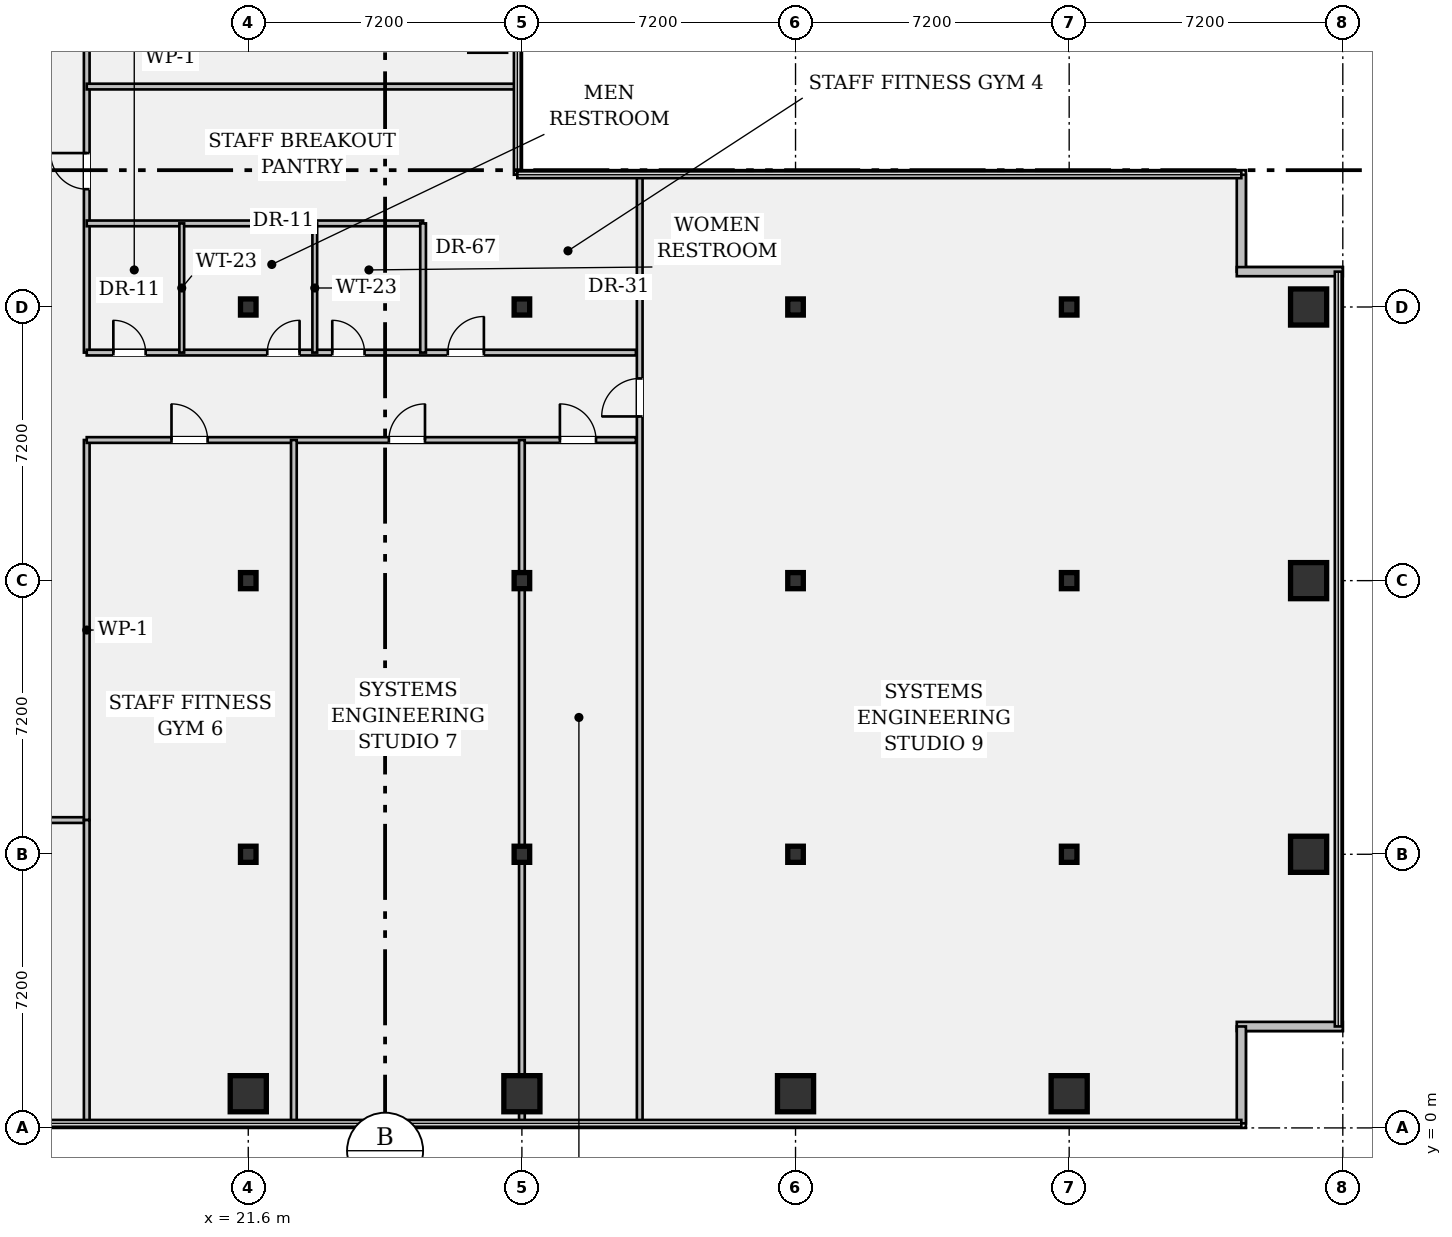
"""IFC4 building model, lengths in metres.
Left out: names, types, materials, properties, quantities, classifications, styles, units other than length and angle.
Written with IfcOpenShell. Run it as: python <this file> out.ifc"""

import sys

from ifc_helpers import new_model, si_unit, direction, frame, frame_2d, origin, origin_2d, place, context, subcontext, project, spatial, rectangle, hollow_rectangle, i_section, extrude, element, fill, save


model = new_model("IFC4")
c1 = context("Model", 3, precision=1e-05, world=origin(), true_north=direction((0.0, 1.0)))
c2 = subcontext(c1, "Body", "Model", "MODEL_VIEW")
j1 = project(units=[si_unit("LENGTHUNIT", "METRE"), si_unit("PLANEANGLEUNIT", "RADIAN")], contexts=[c1])
p1 = place(None, origin())
s1 = spatial("IfcSite", under=j1, at=p1, CompositionType="ELEMENT")
p2 = place(p1, origin())
s2 = spatial("IfcBuilding", under=s1, at=p2, CompositionType="ELEMENT")
p3 = place(p2, frame((0.0, 0.0, 77.35)))
s3 = spatial("IfcBuildingStorey", under=s2, at=p3, CompositionType="ELEMENT", Elevation=77.35)
p4 = place(p3, frame((21.6, 0.9, 0.0), z_axis=(0.0, 0.0, 1.0), x_axis=(1.0, 0.0, 0.0)))
e1 = element("IfcColumn", 1, at=p4, inside=s3, PredefinedType="COLUMN", context=c2, shape_type="SweptSolid", body=[
    extrude(hollow_rectangle(XDim=0.95, YDim=0.95, WallThickness=0.06, at=origin_2d()), origin(), (0.0, 0.0, 1.0), 3.57),
])
for number, where, z_axis, x_axis in (
    (2, (21.6, 7.2, 0.0), (0.0, 0.0, 1.0), (1.0, 0.0, 0.0)),
    (3, (21.6, 14.4, 0.0), (0.0, 0.0, 1.0), (1.0, 0.0, 0.0)),
    (4, (21.6, 21.6, 0.0), (0.0, 0.0, 1.0), (1.0, 0.0, 0.0)),
):
    element("IfcColumn", number, at=place(p3, frame(where, z_axis=z_axis, x_axis=x_axis)), inside=s3, PredefinedType="COLUMN", context=c2, shape_type="SweptSolid", body=[
        extrude(i_section(OverallWidth=0.409, OverallDepth=0.424, WebThickness=0.033, FlangeThickness=0.052, FilletRadius=0.018, at=origin_2d()), origin(), (0.0, 0.0, 1.0), 3.57),
    ])
p5 = place(p3, frame((28.8, 0.9, 0.0), z_axis=(0.0, 0.0, 1.0), x_axis=(1.0, 0.0, 0.0)))
e5 = element("IfcColumn", 5, at=p5, inside=s3, PredefinedType="COLUMN", context=c2, shape_type="SweptSolid", body=[
    extrude(hollow_rectangle(XDim=0.95, YDim=0.95, WallThickness=0.06, at=origin_2d()), origin(), (0.0, 0.0, 1.0), 3.57),
])
for number, where, z_axis, x_axis in (
    (6, (28.8, 7.2, 0.0), (0.0, 0.0, 1.0), (1.0, 0.0, 0.0)),
    (7, (28.8, 14.4, 0.0), (0.0, 0.0, 1.0), (1.0, 0.0, 0.0)),
    (8, (28.8, 21.6, 0.0), (0.0, 0.0, 1.0), (1.0, 0.0, 0.0)),
):
    element("IfcColumn", number, at=place(p3, frame(where, z_axis=z_axis, x_axis=x_axis)), inside=s3, PredefinedType="COLUMN", context=c2, shape_type="SweptSolid", body=[
        extrude(i_section(OverallWidth=0.409, OverallDepth=0.424, WebThickness=0.033, FlangeThickness=0.052, FilletRadius=0.018, at=origin_2d()), origin(), (0.0, 0.0, 1.0), 3.57),
    ])
p6 = place(p3, frame((36.0, 0.9, 0.0), z_axis=(0.0, 0.0, 1.0), x_axis=(1.0, 0.0, 0.0)))
e9 = element("IfcColumn", 9, at=p6, inside=s3, PredefinedType="COLUMN", context=c2, shape_type="SweptSolid", body=[
    extrude(hollow_rectangle(XDim=0.95, YDim=0.95, WallThickness=0.06, at=origin_2d()), origin(), (0.0, 0.0, 1.0), 3.57),
])
for number, where, z_axis, x_axis in (
    (10, (36.0, 7.2, 0.0), (0.0, 0.0, 1.0), (1.0, 0.0, 0.0)),
    (11, (36.0, 14.4, 0.0), (0.0, 0.0, 1.0), (1.0, 0.0, 0.0)),
    (12, (36.0, 21.6, 0.0), (0.0, 0.0, 1.0), (1.0, 0.0, 0.0)),
):
    element("IfcColumn", number, at=place(p3, frame(where, z_axis=z_axis, x_axis=x_axis)), inside=s3, PredefinedType="COLUMN", context=c2, shape_type="SweptSolid", body=[
        extrude(i_section(OverallWidth=0.409, OverallDepth=0.424, WebThickness=0.033, FlangeThickness=0.052, FilletRadius=0.018, at=origin_2d()), origin(), (0.0, 0.0, 1.0), 3.57),
    ])
p7 = place(p3, frame((43.2, 0.9, 0.0), z_axis=(0.0, 0.0, 1.0), x_axis=(1.0, 0.0, 0.0)))
e13 = element("IfcColumn", 13, at=p7, inside=s3, PredefinedType="COLUMN", context=c2, shape_type="SweptSolid", body=[
    extrude(hollow_rectangle(XDim=0.95, YDim=0.95, WallThickness=0.06, at=origin_2d()), origin(), (0.0, 0.0, 1.0), 3.57),
])
for number, where, z_axis, x_axis in (
    (14, (43.2, 7.2, 0.0), (0.0, 0.0, 1.0), (1.0, 0.0, 0.0)),
    (15, (43.2, 14.4, 0.0), (0.0, 0.0, 1.0), (1.0, 0.0, 0.0)),
    (16, (43.2, 21.6, 0.0), (0.0, 0.0, 1.0), (1.0, 0.0, 0.0)),
):
    element("IfcColumn", number, at=place(p3, frame(where, z_axis=z_axis, x_axis=x_axis)), inside=s3, PredefinedType="COLUMN", context=c2, shape_type="SweptSolid", body=[
        extrude(i_section(OverallWidth=0.409, OverallDepth=0.424, WebThickness=0.033, FlangeThickness=0.052, FilletRadius=0.018, at=origin_2d()), origin(), (0.0, 0.0, 1.0), 3.57),
    ])
for number, where, z_axis, x_axis in (
    (17, (49.5, 7.2, 0.0), (0.0, 0.0, 1.0), (1.0, 0.0, 0.0)),
    (18, (49.5, 14.4, 0.0), (0.0, 0.0, 1.0), (1.0, 0.0, 0.0)),
    (19, (49.5, 21.6, 0.0), (0.0, 0.0, 1.0), (1.0, 0.0, 0.0)),
):
    element("IfcColumn", number, at=place(p3, frame(where, z_axis=z_axis, x_axis=x_axis)), inside=s3, PredefinedType="COLUMN", context=c2, shape_type="SweptSolid", body=[
        extrude(hollow_rectangle(XDim=0.95, YDim=0.95, WallThickness=0.06, at=origin_2d()), origin(), (0.0, 0.0, 1.0), 3.57),
    ])
p8 = place(p3, frame((47.73, 25.08, 0.0), z_axis=(0.0, 0.0, 1.0), x_axis=(0.0, -1.0, 0.0)))
e20 = element("IfcWall", 20, at=p8, inside=s3, PredefinedType="STANDARD", context=c2, shape_type="SweptSolid", body=[
    extrude(rectangle(XDim=2.55, YDim=0.24, at=frame_2d((1.275, 0.0))), origin(), (0.0, 0.0, 1.0), 3.57),
])
for number, where, z_axis, x_axis in (
    (21, (47.61, 22.53, 0.0), (0.0, 0.0, 1.0), (1.0, 0.0, 0.0)),
    (22, (50.4, 2.67, 0.0), (0.0, 0.0, 1.0), (-1.0, 0.0, 0.0)),
):
    element("IfcWall", number, at=place(p3, frame(where, z_axis=z_axis, x_axis=x_axis)), inside=s3, PredefinedType="STANDARD", context=c2, shape_type="SweptSolid", body=[
        extrude(rectangle(XDim=2.79, YDim=0.24, at=frame_2d((1.395, 0.0))), origin(), (0.0, 0.0, 1.0), 3.57),
    ])
p9 = place(p3, frame((47.73, 2.67, 0.0), z_axis=(0.0, 0.0, 1.0), x_axis=(0.0, -1.0, 0.0)))
e23 = element("IfcWall", 23, at=p9, inside=s3, PredefinedType="STANDARD", context=c2, shape_type="SweptSolid", body=[
    extrude(rectangle(XDim=2.55, YDim=0.24, at=frame_2d((1.275, 0.0))), origin(), (0.0, 0.0, 1.0), 3.57),
])
p10 = place(p3, frame((14.4, 8.1, 0.0), z_axis=(0.0, 0.0, 1.0), x_axis=(1.0, 0.0, 0.0)))
e24 = element("IfcWall", 24, at=p10, inside=s3, PredefinedType="PARTITIONING", context=c2, shape_type="SweptSolid", body=[
    extrude(rectangle(XDim=2.95, YDim=0.15, at=frame_2d((1.475, 0.0))), origin(), (0.0, 0.0, 1.0), 3.088),
])
p11 = place(p10, frame((0.95, 0.0, 0.0)))
e25 = element("IfcOpeningElement", 25, at=p11, cuts=e24, PredefinedType="OPENING", context=c2, shape_type="SweptSolid", body=[
    extrude(rectangle(XDim=0.95, YDim=2.15, at=frame_2d((0.475, 1.075))), frame((0.0, 0.087, 0.0), z_axis=(0.0, -1.0, 0.0), x_axis=(1.0, 0.0, 0.0)), (0.0, 0.0, 1.0), 0.174),
])
p12 = place(p3, frame((17.35, 8.1, 0.0), z_axis=(0.0, 0.0, 1.0), x_axis=(0.0, 1.0, 0.0)))
e26 = element("IfcWall", 26, at=p12, inside=s3, PredefinedType="PARTITIONING", context=c2, shape_type="SweptSolid", body=[
    extrude(rectangle(XDim=10.0, YDim=0.15, at=frame_2d((5.0, 0.0))), origin(), (0.0, 0.0, 1.0), 2.783),
])
p13 = place(p3, frame((17.35, 20.4, 0.0), z_axis=(0.0, 0.0, 1.0), x_axis=(0.0, 1.0, 0.0)))
e27 = element("IfcWall", 27, at=p13, inside=s3, PredefinedType="PARTITIONING", context=c2, shape_type="SweptSolid", body=[
    extrude(rectangle(XDim=15.5, YDim=0.15, at=frame_2d((7.75, 0.0))), origin(), (0.0, 0.0, 1.0), 2.783),
])
p14 = place(p13, frame((4.3, 0.0, 0.0)))
e28 = element("IfcOpeningElement", 28, at=p14, cuts=e27, PredefinedType="OPENING", context=c2, shape_type="SweptSolid", body=[
    extrude(rectangle(XDim=0.95, YDim=2.15, at=frame_2d((0.475, 1.075))), frame((0.0, 0.087, 0.0), z_axis=(0.0, -1.0, 0.0), x_axis=(1.0, 0.0, 0.0)), (0.0, 0.0, 1.0), 0.174),
])
p15 = place(p13, frame((8.4, 0.0, 0.0)))
e29 = element("IfcOpeningElement", 29, at=p15, cuts=e27, PredefinedType="OPENING", context=c2, shape_type="SweptSolid", body=[
    extrude(rectangle(XDim=1.0, YDim=2.15, at=frame_2d((0.5, 1.075))), frame((0.0, 0.087, 0.0), z_axis=(0.0, -1.0, 0.0), x_axis=(1.0, 0.0, 0.0)), (0.0, 0.0, 1.0), 0.174),
])
p16 = place(p3, frame((17.35, 18.1, 0.0), z_axis=(0.0, 0.0, 1.0), x_axis=(1.0, 0.0, 0.0)))
e30 = element("IfcWall", 30, at=p16, inside=s3, PredefinedType="PARTITIONING", context=c2, shape_type="SweptSolid", body=[
    extrude(rectangle(XDim=14.45, YDim=0.15, at=frame_2d((7.225, 0.0))), origin(), (0.0, 0.0, 1.0), 2.783),
])
p17 = place(p16, frame((2.23, 0.0, 0.0)))
e31 = element("IfcOpeningElement", 31, at=p17, cuts=e30, PredefinedType="OPENING", context=c2, shape_type="SweptSolid", body=[
    extrude(rectangle(XDim=0.95, YDim=2.15, at=frame_2d((0.475, 1.075))), frame((0.0, 0.087, 0.0), z_axis=(0.0, -1.0, 0.0), x_axis=(1.0, 0.0, 0.0)), (0.0, 0.0, 1.0), 0.174),
])
p18 = place(p16, frame((7.95, 0.0, 0.0)))
e32 = element("IfcOpeningElement", 32, at=p18, cuts=e30, PredefinedType="OPENING", context=c2, shape_type="SweptSolid", body=[
    extrude(rectangle(XDim=0.95, YDim=2.15, at=frame_2d((0.475, 1.075))), frame((0.0, 0.087, 0.0), z_axis=(0.0, -1.0, 0.0), x_axis=(1.0, 0.0, 0.0)), (0.0, 0.0, 1.0), 0.174),
])
p19 = place(p16, frame((12.45, 0.0, 0.0)))
e33 = element("IfcOpeningElement", 33, at=p19, cuts=e30, PredefinedType="OPENING", context=c2, shape_type="SweptSolid", body=[
    extrude(rectangle(XDim=0.95, YDim=2.15, at=frame_2d((0.475, 1.075))), frame((0.0, 0.087, 0.0), z_axis=(0.0, -1.0, 0.0), x_axis=(1.0, 0.0, 0.0)), (0.0, 0.0, 1.0), 0.174),
])
p20 = place(p3, frame((17.35, 20.4, 0.0), z_axis=(0.0, 0.0, 1.0), x_axis=(1.0, 0.0, 0.0)))
e34 = element("IfcWall", 34, at=p20, inside=s3, PredefinedType="PARTITIONING", context=c2, shape_type="SweptSolid", body=[
    extrude(rectangle(XDim=14.45, YDim=0.15, at=frame_2d((7.225, 0.0))), origin(), (0.0, 0.0, 1.0), 2.783),
])
p21 = place(p20, frame((0.7, 0.0, 0.0)))
e35 = element("IfcOpeningElement", 35, at=p21, cuts=e34, PredefinedType="OPENING", context=c2, shape_type="SweptSolid", body=[
    extrude(rectangle(XDim=0.85, YDim=2.15, at=frame_2d((0.425, 1.075))), frame((0.0, 0.087, 0.0), z_axis=(0.0, -1.0, 0.0), x_axis=(1.0, 0.0, 0.0)), (0.0, 0.0, 1.0), 0.174),
])
p22 = place(p20, frame((4.75, 0.0, 0.0)))
e36 = element("IfcOpeningElement", 36, at=p22, cuts=e34, PredefinedType="OPENING", context=c2, shape_type="SweptSolid", body=[
    extrude(rectangle(XDim=0.85, YDim=2.15, at=frame_2d((0.425, 1.075))), frame((0.0, 0.087, 0.0), z_axis=(0.0, -1.0, 0.0), x_axis=(1.0, 0.0, 0.0)), (0.0, 0.0, 1.0), 0.174),
])
p23 = place(p20, frame((6.46, 0.0, 0.0)))
e37 = element("IfcOpeningElement", 37, at=p23, cuts=e34, PredefinedType="OPENING", context=c2, shape_type="SweptSolid", body=[
    extrude(rectangle(XDim=0.85, YDim=2.15, at=frame_2d((0.425, 1.075))), frame((0.0, 0.087, 0.0), z_axis=(0.0, -1.0, 0.0), x_axis=(1.0, 0.0, 0.0)), (0.0, 0.0, 1.0), 0.174),
])
p24 = place(p20, frame((9.5, 0.0, 0.0)))
e38 = element("IfcOpeningElement", 38, at=p24, cuts=e34, PredefinedType="OPENING", context=c2, shape_type="SweptSolid", body=[
    extrude(rectangle(XDim=0.95, YDim=2.15, at=frame_2d((0.475, 1.075))), frame((0.0, 0.087, 0.0), z_axis=(0.0, -1.0, 0.0), x_axis=(1.0, 0.0, 0.0)), (0.0, 0.0, 1.0), 0.174),
])
p25 = place(p3, frame((31.9, 0.12, 0.0), z_axis=(0.0, 0.0, 1.0), x_axis=(0.0, 1.0, 0.0)))
e39 = element("IfcWall", 39, at=p25, inside=s3, PredefinedType="PARTITIONING", context=c2, shape_type="SweptSolid", body=[
    extrude(rectangle(XDim=24.96, YDim=0.15, at=frame_2d((12.48, 0.0))), origin(), (0.0, 0.0, 1.0), 2.783),
])
p26 = place(p25, frame((18.6, 0.0, 0.0)))
e40 = element("IfcOpeningElement", 40, at=p26, cuts=e39, PredefinedType="OPENING", context=c2, shape_type="SweptSolid", body=[
    extrude(rectangle(XDim=1.0, YDim=2.15, at=frame_2d((0.5, 1.075))), frame((0.0, 0.087, 0.0), z_axis=(0.0, -1.0, 0.0), x_axis=(1.0, 0.0, 0.0)), (0.0, 0.0, 1.0), 0.174),
])
p27 = place(p3, frame((17.35, 23.8, 0.0), z_axis=(0.0, 0.0, 1.0), x_axis=(1.0, 0.0, 0.0)))
e41 = element("IfcWall", 41, at=p27, inside=s3, PredefinedType="PARTITIONING", context=c2, shape_type="SweptSolid", body=[
    extrude(rectangle(XDim=8.85, YDim=0.15, at=frame_2d((4.425, 0.0))), origin(), (0.0, 0.0, 1.0), 2.783),
])
p28 = place(p3, frame((26.2, 20.4, 0.0), z_axis=(0.0, 0.0, 1.0), x_axis=(0.0, 1.0, 0.0)))
e42 = element("IfcWall", 42, at=p28, inside=s3, PredefinedType="PARTITIONING", context=c2, shape_type="SweptSolid", body=[
    extrude(rectangle(XDim=3.4, YDim=0.15, at=frame_2d((1.7, 0.0))), origin(), (0.0, 0.0, 1.0), 2.783),
])
for number, where, z_axis, x_axis in (
    (43, (19.85, 20.4, 0.0), (0.0, 0.0, 1.0), (0.0, 1.0, 0.0)),
    (44, (23.35, 20.4, 0.0), (0.0, 0.0, 1.0), (0.0, 1.0, 0.0)),
):
    element("IfcWall", number, at=place(p3, frame(where, z_axis=z_axis, x_axis=x_axis)), inside=s3, PredefinedType="PARTITIONING", context=c2, shape_type="SweptSolid", body=[
        extrude(rectangle(XDim=3.4, YDim=0.125, at=frame_2d((1.7, 0.0))), origin(), (0.0, 0.0, 1.0), 2.783),
    ])
p29 = place(p3, frame((17.35, 27.4, 0.0), z_axis=(0.0, 0.0, 1.0), x_axis=(1.0, 0.0, 0.0)))
e45 = element("IfcWall", 45, at=p29, inside=s3, PredefinedType="PARTITIONING", context=c2, shape_type="SweptSolid", body=[
    extrude(rectangle(XDim=11.33, YDim=0.15, at=frame_2d((5.665, 0.0))), origin(), (0.0, 0.0, 1.0), 2.783),
])
p30 = place(p3, frame((17.35, 0.12, 0.0), z_axis=(0.0, 0.0, 1.0), x_axis=(0.0, 1.0, 0.0)))
e46 = element("IfcWall", 46, at=p30, inside=s3, PredefinedType="PARTITIONING", context=c2, shape_type="SweptSolid", body=[
    extrude(rectangle(XDim=7.98, YDim=0.15, at=frame_2d((3.99, 0.0))), origin(), (0.0, 0.0, 1.0), 2.783),
])
for number, where, z_axis, x_axis in (
    (47, (22.8, 0.12, 0.0), (0.0, 0.0, 1.0), (0.0, 1.0, 0.0)),
    (48, (28.8, 0.12, 0.0), (0.0, 0.0, 1.0), (0.0, 1.0, 0.0)),
):
    element("IfcWall", number, at=place(p3, frame(where, z_axis=z_axis, x_axis=x_axis)), inside=s3, PredefinedType="PARTITIONING", context=c2, shape_type="SweptSolid", body=[
        extrude(rectangle(XDim=17.98, YDim=0.15, at=frame_2d((8.99, 0.0))), origin(), (0.0, 0.0, 1.0), 2.783),
    ])
p31 = place(p21, origin())
e49 = element("IfcDoor", 49, at=p31, inside=s3, OperationType="SINGLE_SWING_LEFT", PredefinedType="DOOR", context=c2, shape_type="SweptSolid", body=[
    extrude(rectangle(XDim=0.85, YDim=2.15, at=frame_2d((0.425, 1.075))), frame((0.0, 0.025, 0.0), z_axis=(0.0, -1.0, 0.0), x_axis=(1.0, 0.0, 0.0)), (0.0, 0.0, 1.0), 0.05),
])
fill(e35, e49)
p32 = place(p22, origin())
e50 = element("IfcDoor", 50, at=p32, inside=s3, OperationType="SINGLE_SWING_RIGHT", PredefinedType="DOOR", context=c2, shape_type="SweptSolid", body=[
    extrude(rectangle(XDim=0.85, YDim=2.15, at=frame_2d((0.425, 1.075))), frame((0.0, 0.025, 0.0), z_axis=(0.0, -1.0, 0.0), x_axis=(1.0, 0.0, 0.0)), (0.0, 0.0, 1.0), 0.05),
])
fill(e36, e50)
p33 = place(p23, origin())
e51 = element("IfcDoor", 51, at=p33, inside=s3, OperationType="SINGLE_SWING_LEFT", PredefinedType="DOOR", context=c2, shape_type="SweptSolid", body=[
    extrude(rectangle(XDim=0.85, YDim=2.15, at=frame_2d((0.425, 1.075))), frame((0.0, 0.025, 0.0), z_axis=(0.0, -1.0, 0.0), x_axis=(1.0, 0.0, 0.0)), (0.0, 0.0, 1.0), 0.05),
])
fill(e37, e51)
p34 = place(p14, origin())
e52 = element("IfcDoor", 52, at=p34, inside=s3, OperationType="SINGLE_SWING_RIGHT", PredefinedType="DOOR", context=c2, shape_type="SweptSolid", body=[
    extrude(rectangle(XDim=0.95, YDim=2.15, at=frame_2d((0.475, 1.075))), frame((0.0, 0.025, 0.0), z_axis=(0.0, -1.0, 0.0), x_axis=(1.0, 0.0, 0.0)), (0.0, 0.0, 1.0), 0.05),
])
fill(e28, e52)
p35 = place(p24, origin())
e53 = element("IfcDoor", 53, at=p35, inside=s3, OperationType="SINGLE_SWING_RIGHT", PredefinedType="DOOR", context=c2, shape_type="SweptSolid", body=[
    extrude(rectangle(XDim=0.95, YDim=2.15, at=frame_2d((0.475, 1.075))), frame((0.0, 0.025, 0.0), z_axis=(0.0, -1.0, 0.0), x_axis=(1.0, 0.0, 0.0)), (0.0, 0.0, 1.0), 0.05),
])
fill(e38, e53)
p36 = place(p17, origin())
e54 = element("IfcDoor", 54, at=p36, inside=s3, OperationType="SINGLE_SWING_LEFT", PredefinedType="DOOR", context=c2, shape_type="SweptSolid", body=[
    extrude(rectangle(XDim=0.95, YDim=2.15, at=frame_2d((0.475, 1.075))), frame((0.0, 0.025, 0.0), z_axis=(0.0, -1.0, 0.0), x_axis=(1.0, 0.0, 0.0)), (0.0, 0.0, 1.0), 0.05),
])
fill(e31, e54)
p37 = place(p18, origin())
e55 = element("IfcDoor", 55, at=p37, inside=s3, OperationType="SINGLE_SWING_RIGHT", PredefinedType="DOOR", context=c2, shape_type="SweptSolid", body=[
    extrude(rectangle(XDim=0.95, YDim=2.15, at=frame_2d((0.475, 1.075))), frame((0.0, 0.025, 0.0), z_axis=(0.0, -1.0, 0.0), x_axis=(1.0, 0.0, 0.0)), (0.0, 0.0, 1.0), 0.05),
])
fill(e32, e55)
p38 = place(p19, origin())
e56 = element("IfcDoor", 56, at=p38, inside=s3, OperationType="SINGLE_SWING_LEFT", PredefinedType="DOOR", context=c2, shape_type="SweptSolid", body=[
    extrude(rectangle(XDim=0.95, YDim=2.15, at=frame_2d((0.475, 1.075))), frame((0.0, 0.025, 0.0), z_axis=(0.0, -1.0, 0.0), x_axis=(1.0, 0.0, 0.0)), (0.0, 0.0, 1.0), 0.05),
])
fill(e33, e56)
p39 = place(p26, origin())
e57 = element("IfcDoor", 57, at=p39, inside=s3, OperationType="SINGLE_SWING_LEFT", PredefinedType="DOOR", context=c2, shape_type="SweptSolid", body=[
    extrude(rectangle(XDim=1.0, YDim=2.15, at=frame_2d((0.5, 1.075))), frame((0.0, 0.025, 0.0), z_axis=(0.0, -1.0, 0.0), x_axis=(1.0, 0.0, 0.0)), (0.0, 0.0, 1.0), 0.05),
])
fill(e40, e57)
save(model, sys.argv[1])
